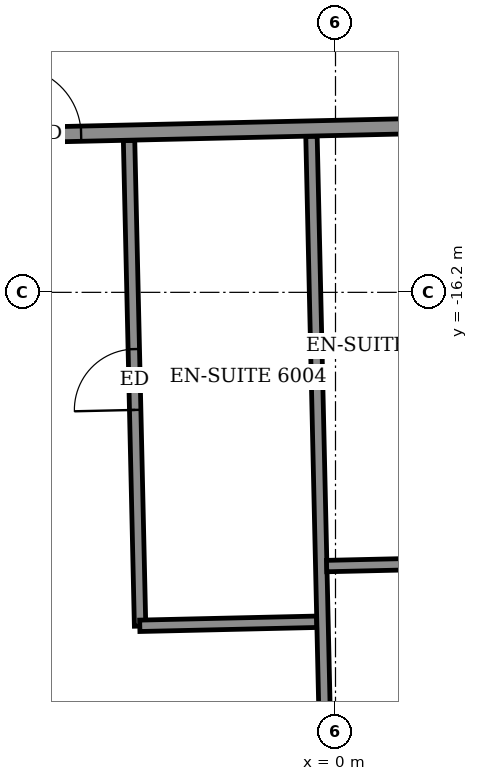
"""IFC4 building model, lengths in metres.
Left out: names, types, materials, properties, quantities, classifications, styles, units other than length and angle.
Written with IfcOpenShell. Run it as: python <this file> out.ifc"""

import sys

from ifc_helpers import new_model, si_unit, direction, frame, frame_2d, origin, place, context, subcontext, project, spatial, rectangle, extrude, element, fill, save


model = new_model("IFC4")
c1 = context("Model", 3, precision=1e-05, world=origin(), true_north=direction((0.0, 1.0)))
c2 = subcontext(c1, "Body", "Model", "MODEL_VIEW")
j1 = project(units=[si_unit("LENGTHUNIT", "METRE"), si_unit("PLANEANGLEUNIT", "RADIAN")], contexts=[c1])
p1 = place(None, origin())
s1 = spatial("IfcSite", under=j1, at=p1, CompositionType="ELEMENT")
p2 = place(p1, origin())
s2 = spatial("IfcBuilding", under=s1, at=p2, CompositionType="ELEMENT")
p3 = place(p2, frame((0.0, 0.0, 238.3)))
s3 = spatial("IfcBuildingStorey", under=s2, at=p3, CompositionType="ELEMENT", Elevation=238.3)
p4 = place(p3, frame((-0.058, -25.521, 0.0), z_axis=(0.0, 0.0, 1.0), x_axis=(-0.022662905301, 0.999743163379, 0.0)))
e1 = element("IfcWall", 1, at=p4, inside=s3, PredefinedType="PARTITIONING", context=c2, shape_type="SweptSolid", body=[
    extrude(rectangle(XDim=11.376, YDim=0.15, at=frame_2d((5.688, 0.0))), origin(), (0.0, 0.0, 1.0), 2.5),
])
p5 = place(p3, frame((-2.571, -20.591, 0.0), z_axis=(0.0, 0.0, 1.0), x_axis=(-0.022695368097, 0.999742426962, 0.0)))
e2 = element("IfcWall", 2, at=p5, inside=s3, PredefinedType="PARTITIONING", context=c2, shape_type="SweptSolid", body=[
    extrude(rectangle(XDim=6.39, YDim=0.15, at=frame_2d((3.195, 0.0))), origin(), (0.0, 0.0, 1.0), 3.05),
])
p6 = place(p5, frame((2.845, 0.0, 0.0)))
e3 = element("IfcOpeningElement", 3, at=p6, cuts=e2, PredefinedType="OPENING", context=c2, shape_type="SweptSolid", body=[
    extrude(rectangle(XDim=0.8, YDim=2.1, at=frame_2d((0.4, 1.05))), frame((0.0, 0.085, 0.0), z_axis=(0.0, -1.0, 0.0), x_axis=(1.0, 0.0, 0.0)), (0.0, 0.0, 1.0), 0.17),
])
for number, where, z_axis, x_axis in (
    (4, (-2.575, -20.587, 0.0), (0.0, 0.0, 1.0), (1.0, 0.023, 0.0)),
    (5, (-0.117, -19.801, 0.0), (0.0, 0.0, 1.0), (1.0, 0.023, 0.0)),
):
    element("IfcWall", number, at=place(p3, frame(where, z_axis=z_axis, x_axis=x_axis)), inside=s3, PredefinedType="PARTITIONING", context=c2, shape_type="SweptSolid", body=[
        extrude(rectangle(XDim=2.325, YDim=0.15, at=frame_2d((1.163, 0.0))), origin(), (0.0, 0.0, 1.0), 3.05),
    ])
p7 = place(p3, frame((-27.016, -14.65, 0.0), z_axis=(0.0, 0.0, 1.0), x_axis=(0.999742623033, 0.022686729391, 0.0)))
e6 = element("IfcWall", 6, at=p7, inside=s3, PredefinedType="PARTITIONING", context=c2, shape_type="SweptSolid", body=[
    extrude(rectangle(XDim=50.858, YDim=0.2, at=frame_2d((25.429, 0.0))), origin(), (0.0, 0.0, 1.0), 3.05),
])
p8 = place(p7, frame((1.625, 0.0, 0.0)))
e7 = element("IfcOpeningElement", 7, at=p8, cuts=e6, PredefinedType="OPENING", context=c2, shape_type="SweptSolid", body=[
    extrude(rectangle(XDim=1.0, YDim=2.1, at=frame_2d((0.5, 1.05))), frame((0.0, 0.11, 0.0), z_axis=(0.0, -1.0, 0.0), x_axis=(1.0, 0.0, 0.0)), (0.0, 0.0, 1.0), 0.22),
])
p9 = place(p7, frame((6.6, 0.0, 0.0)))
e8 = element("IfcOpeningElement", 8, at=p9, cuts=e6, PredefinedType="OPENING", context=c2, shape_type="SweptSolid", body=[
    extrude(rectangle(XDim=0.9, YDim=2.1, at=frame_2d((0.45, 1.05))), frame((0.0, 0.11, 0.0), z_axis=(0.0, -1.0, 0.0), x_axis=(1.0, 0.0, 0.0)), (0.0, 0.0, 1.0), 0.22),
])
p10 = place(p7, frame((11.5, 0.0, 0.0)))
e9 = element("IfcOpeningElement", 9, at=p10, cuts=e6, PredefinedType="OPENING", context=c2, shape_type="SweptSolid", body=[
    extrude(rectangle(XDim=0.9, YDim=2.1, at=frame_2d((0.45, 1.05))), frame((0.0, 0.11, 0.0), z_axis=(0.0, -1.0, 0.0), x_axis=(1.0, 0.0, 0.0)), (0.0, 0.0, 1.0), 0.22),
])
p11 = place(p7, frame((13.675, 0.0, 0.0)))
e10 = element("IfcOpeningElement", 10, at=p11, cuts=e6, PredefinedType="OPENING", context=c2, shape_type="SweptSolid", body=[
    extrude(rectangle(XDim=0.9, YDim=2.1, at=frame_2d((0.45, 1.05))), frame((0.0, 0.11, 0.0), z_axis=(0.0, -1.0, 0.0), x_axis=(1.0, 0.0, 0.0)), (0.0, 0.0, 1.0), 0.22),
])
p12 = place(p7, frame((20.625, 0.0, 0.0)))
e11 = element("IfcOpeningElement", 11, at=p12, cuts=e6, PredefinedType="OPENING", context=c2, shape_type="SweptSolid", body=[
    extrude(rectangle(XDim=0.9, YDim=2.1, at=frame_2d((0.45, 1.05))), frame((0.0, 0.11, 0.0), z_axis=(0.0, -1.0, 0.0), x_axis=(1.0, 0.0, 0.0)), (0.0, 0.0, 1.0), 0.22),
])
p13 = place(p7, frame((22.775, 0.0, 0.0)))
e12 = element("IfcOpeningElement", 12, at=p13, cuts=e6, PredefinedType="OPENING", context=c2, shape_type="SweptSolid", body=[
    extrude(rectangle(XDim=0.9, YDim=2.1, at=frame_2d((0.45, 1.05))), frame((0.0, 0.11, 0.0), z_axis=(0.0, -1.0, 0.0), x_axis=(1.0, 0.0, 0.0)), (0.0, 0.0, 1.0), 0.22),
])
p14 = place(p7, frame((29.65, 0.0, 0.0)))
e13 = element("IfcOpeningElement", 13, at=p14, cuts=e6, PredefinedType="OPENING", context=c2, shape_type="SweptSolid", body=[
    extrude(rectangle(XDim=0.9, YDim=2.1, at=frame_2d((0.45, 1.05))), frame((0.0, 0.11, 0.0), z_axis=(0.0, -1.0, 0.0), x_axis=(1.0, 0.0, 0.0)), (0.0, 0.0, 1.0), 0.22),
])
p15 = place(p7, frame((31.625, 0.0, 0.0)))
e14 = element("IfcOpeningElement", 14, at=p15, cuts=e6, PredefinedType="OPENING", context=c2, shape_type="SweptSolid", body=[
    extrude(rectangle(XDim=0.9, YDim=2.1, at=frame_2d((0.45, 1.05))), frame((0.0, 0.11, 0.0), z_axis=(0.0, -1.0, 0.0), x_axis=(1.0, 0.0, 0.0)), (0.0, 0.0, 1.0), 0.22),
])
p16 = place(p7, frame((38.5, 0.0, 0.0)))
e15 = element("IfcOpeningElement", 15, at=p16, cuts=e6, PredefinedType="OPENING", context=c2, shape_type="SweptSolid", body=[
    extrude(rectangle(XDim=0.9, YDim=2.1, at=frame_2d((0.45, 1.05))), frame((0.0, 0.11, 0.0), z_axis=(0.0, -1.0, 0.0), x_axis=(1.0, 0.0, 0.0)), (0.0, 0.0, 1.0), 0.22),
])
p17 = place(p7, frame((40.55, 0.0, 0.0)))
e16 = element("IfcOpeningElement", 16, at=p17, cuts=e6, PredefinedType="OPENING", context=c2, shape_type="SweptSolid", body=[
    extrude(rectangle(XDim=0.9, YDim=2.1, at=frame_2d((0.45, 1.05))), frame((0.0, 0.11, 0.0), z_axis=(0.0, -1.0, 0.0), x_axis=(1.0, 0.0, 0.0)), (0.0, 0.0, 1.0), 0.22),
])
p18 = place(p7, frame((47.601, 0.0, 0.0)))
e17 = element("IfcOpeningElement", 17, at=p18, cuts=e6, PredefinedType="OPENING", context=c2, shape_type="SweptSolid", body=[
    extrude(rectangle(XDim=1.0, YDim=2.1, at=frame_2d((0.5, 1.05))), frame((0.0, 0.11, 0.0), z_axis=(0.0, -1.0, 0.0), x_axis=(1.0, 0.0, 0.0)), (0.0, 0.0, 1.0), 0.22),
])
p19 = place(p13, origin())
e18 = element("IfcDoor", 18, at=p19, inside=s3, OperationType="SINGLE_SWING_RIGHT", PredefinedType="DOOR", context=c2, shape_type="SweptSolid", body=[
    extrude(rectangle(XDim=0.9, YDim=2.1, at=frame_2d((0.45, 1.05))), frame((0.0, 0.025, 0.0), z_axis=(0.0, -1.0, 0.0), x_axis=(1.0, 0.0, 0.0)), (0.0, 0.0, 1.0), 0.05),
])
fill(e12, e18)
p20 = place(p6, origin())
e19 = element("IfcDoor", 19, at=p20, inside=s3, OperationType="SINGLE_SWING_RIGHT", PredefinedType="DOOR", context=c2, shape_type="SweptSolid", body=[
    extrude(rectangle(XDim=0.8, YDim=2.1, at=frame_2d((0.4, 1.05))), frame((0.0, 0.025, 0.0), z_axis=(0.0, -1.0, 0.0), x_axis=(1.0, 0.0, 0.0)), (0.0, 0.0, 1.0), 0.05),
])
fill(e3, e19)
save(model, sys.argv[1])
